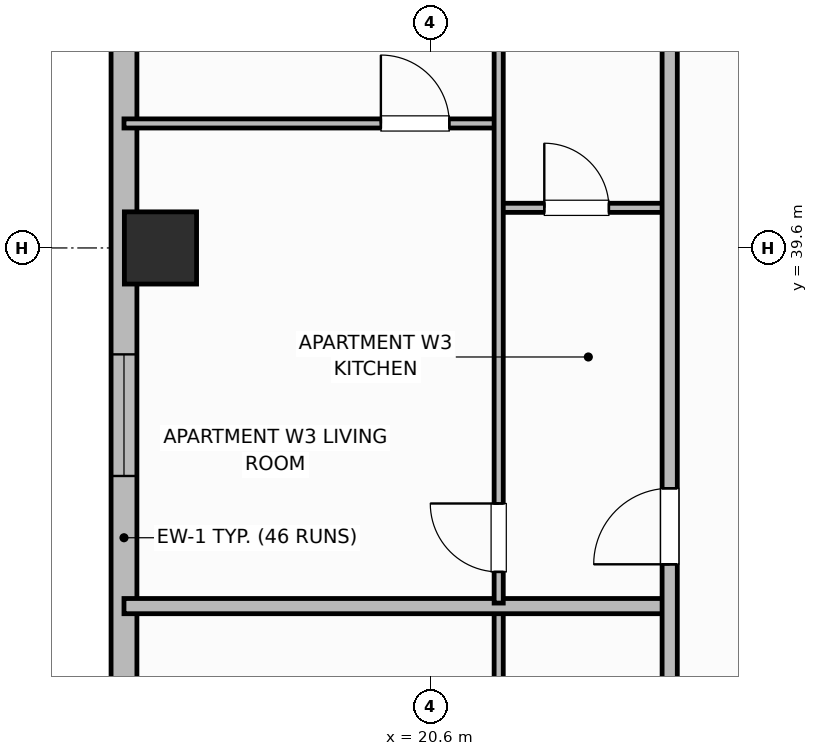
"""IFC4 building model, lengths in metres.
Left out: names, types, materials, properties, quantities, classifications, styles, units other than length and angle.
Written with IfcOpenShell. Run it as: python <this file> out.ifc"""

import sys

from ifc_helpers import new_model, si_unit, direction, frame, frame_2d, origin, origin_2d, place, context, subcontext, project, spatial, rectangle, extrude, element, fill, save


model = new_model("IFC4")
c1 = context("Model", 3, precision=1e-05, world=origin(), true_north=direction((0.0, 1.0)))
c2 = subcontext(c1, "Body", "Model", "MODEL_VIEW")
j1 = project(units=[si_unit("LENGTHUNIT", "METRE"), si_unit("PLANEANGLEUNIT", "RADIAN")], contexts=[c1])
p1 = place(None, origin())
s1 = spatial("IfcSite", under=j1, at=p1, CompositionType="ELEMENT")
p2 = place(p1, origin())
s2 = spatial("IfcBuilding", under=s1, at=p2, CompositionType="ELEMENT")
p3 = place(p2, frame((0.0, 0.0, 188.5)))
s3 = spatial("IfcBuildingStorey", under=s2, at=p3, CompositionType="ELEMENT", Elevation=188.5)
p4 = place(p3, frame((17.05, 39.6, 0.0), z_axis=(0.0, 0.0, 1.0), x_axis=(1.0, 0.0, 0.0)))
e1 = element("IfcColumn", 1, at=p4, inside=s3, PredefinedType="COLUMN", context=c2, shape_type="SweptSolid", body=[
    extrude(rectangle(XDim=0.95, YDim=0.95, at=origin_2d()), origin(), (0.0, 0.0, 1.0), 3.7),
])
p5 = place(p3, frame((16.57, 45.9, 0.0), z_axis=(0.0, 0.0, 1.0), x_axis=(0.0, -1.0, 0.0)))
e2 = element("IfcWall", 2, at=p5, inside=s3, PredefinedType="SOLIDWALL", context=c2, shape_type="SweptSolid", body=[
    extrude(rectangle(XDim=13.3, YDim=0.34, at=frame_2d((6.65, 0.0))), origin(), (0.0, 0.0, 1.0), 2.72),
])
p6 = place(p5, frame((1.35, 0.0, 0.7)))
e3 = element("IfcOpeningElement", 3, at=p6, cuts=e2, PredefinedType="OPENING", context=c2, shape_type="SweptSolid", body=[
    extrude(rectangle(XDim=1.6, YDim=1.9, at=frame_2d((0.8, 0.95))), frame((0.0, 0.18, 0.0), z_axis=(0.0, -1.0, 0.0), x_axis=(1.0, 0.0, 0.0)), (0.0, 0.0, 1.0), 0.36),
])
p7 = place(p5, frame((7.7, 0.0, 0.7)))
e4 = element("IfcOpeningElement", 4, at=p7, cuts=e2, PredefinedType="OPENING", context=c2, shape_type="SweptSolid", body=[
    extrude(rectangle(XDim=1.6, YDim=1.9, at=frame_2d((0.8, 0.95))), frame((0.0, 0.18, 0.0), z_axis=(0.0, -1.0, 0.0), x_axis=(1.0, 0.0, 0.0)), (0.0, 0.0, 1.0), 0.36),
])
p8 = place(p3, frame((21.5, 23.312, 0.0), z_axis=(0.0, 0.0, 1.0), x_axis=(0.0, 1.0, 0.0)))
e5 = element("IfcWall", 5, at=p8, inside=s3, PredefinedType="PARTITIONING", context=c2, shape_type="SweptSolid", body=[
    extrude(rectangle(XDim=11.536, YDim=0.12, at=frame_2d((5.768, 0.0))), origin(), (0.0, 0.0, 1.0), 2.55),
])
p9 = place(p8, frame((0.41, 0.0, 0.0)))
e6 = element("IfcOpeningElement", 6, at=p9, cuts=e5, PredefinedType="OPENING", context=c2, shape_type="SweptSolid", body=[
    extrude(rectangle(XDim=0.9, YDim=2.1, at=frame_2d((0.45, 1.05))), frame((0.0, 0.07, 0.0), z_axis=(0.0, -1.0, 0.0), x_axis=(1.0, 0.0, 0.0)), (0.0, 0.0, 1.0), 0.14),
])
p10 = place(p3, frame((16.57, 34.888, 0.0), z_axis=(0.0, 0.0, 1.0), x_axis=(1.0, 0.0, 0.0)))
e7 = element("IfcWall", 7, at=p10, inside=s3, PredefinedType="PARTITIONING", context=c2, shape_type="SweptSolid", body=[
    extrude(rectangle(XDim=7.18, YDim=0.2, at=frame_2d((3.59, 0.0))), origin(), (0.0, 0.0, 1.0), 2.55),
])
p11 = place(p3, frame((21.5, 40.128, 0.0), z_axis=(0.0, 0.0, 1.0), x_axis=(1.0, 0.0, 0.0)))
e8 = element("IfcWall", 8, at=p11, inside=s3, PredefinedType="PARTITIONING", context=c2, shape_type="SweptSolid", body=[
    extrude(rectangle(XDim=2.25, YDim=0.12, at=frame_2d((1.125, 0.0))), origin(), (0.0, 0.0, 1.0), 2.55),
])
p12 = place(p11, frame((0.6, 0.0, 0.0)))
e9 = element("IfcOpeningElement", 9, at=p12, cuts=e8, PredefinedType="OPENING", context=c2, shape_type="SweptSolid", body=[
    extrude(rectangle(XDim=0.85, YDim=2.1, at=frame_2d((0.425, 1.05))), frame((0.0, 0.07, 0.0), z_axis=(0.0, -1.0, 0.0), x_axis=(1.0, 0.0, 0.0)), (0.0, 0.0, 1.0), 0.14),
])
p13 = place(p3, frame((16.57, 41.238, 0.0), z_axis=(0.0, 0.0, 1.0), x_axis=(1.0, 0.0, 0.0)))
e10 = element("IfcWall", 10, at=p13, inside=s3, PredefinedType="PARTITIONING", context=c2, shape_type="SweptSolid", body=[
    extrude(rectangle(XDim=4.93, YDim=0.12, at=frame_2d((2.465, 0.0))), origin(), (0.0, 0.0, 1.0), 2.55),
])
p14 = place(p13, frame((3.38, 0.0, 0.0)))
e11 = element("IfcOpeningElement", 11, at=p14, cuts=e10, PredefinedType="OPENING", context=c2, shape_type="SweptSolid", body=[
    extrude(rectangle(XDim=0.9, YDim=2.1, at=frame_2d((0.45, 1.05))), frame((0.0, 0.07, 0.0), z_axis=(0.0, -1.0, 0.0), x_axis=(1.0, 0.0, 0.0)), (0.0, 0.0, 1.0), 0.14),
])
p15 = place(p3, frame((21.5, 34.928, 0.0), z_axis=(0.0, 0.0, 1.0), x_axis=(0.0, 1.0, 0.0)))
e12 = element("IfcWall", 12, at=p15, inside=s3, PredefinedType="PARTITIONING", context=c2, shape_type="SweptSolid", body=[
    extrude(rectangle(XDim=10.832, YDim=0.12, at=frame_2d((5.416, 0.0))), origin(), (0.0, 0.0, 1.0), 2.55),
])
p16 = place(p15, frame((0.41, 0.0, 0.0)))
e13 = element("IfcOpeningElement", 13, at=p16, cuts=e12, PredefinedType="OPENING", context=c2, shape_type="SweptSolid", body=[
    extrude(rectangle(XDim=0.9, YDim=2.1, at=frame_2d((0.45, 1.05))), frame((0.0, 0.07, 0.0), z_axis=(0.0, -1.0, 0.0), x_axis=(1.0, 0.0, 0.0)), (0.0, 0.0, 1.0), 0.14),
])
p17 = place(p3, frame((23.75, 10.6, 0.0), z_axis=(0.0, 0.0, 1.0), x_axis=(0.0, 1.0, 0.0)))
e14 = element("IfcWall", 14, at=p17, inside=s3, PredefinedType="PARTITIONING", context=c2, shape_type="SweptSolid", body=[
    extrude(rectangle(XDim=35.2, YDim=0.2, at=frame_2d((17.6, 0.0))), origin(), (0.0, 0.0, 1.0), 2.55),
])
p18 = place(p17, frame((2.65, 0.0, 0.0)))
e15 = element("IfcOpeningElement", 15, at=p18, cuts=e14, PredefinedType="OPENING", context=c2, shape_type="SweptSolid", body=[
    extrude(rectangle(XDim=1.0, YDim=2.15, at=frame_2d((0.5, 1.075))), frame((0.0, 0.11, 0.0), z_axis=(0.0, -1.0, 0.0), x_axis=(1.0, 0.0, 0.0)), (0.0, 0.0, 1.0), 0.22),
])
p19 = place(p17, frame((13.222, 0.0, 0.0)))
e16 = element("IfcOpeningElement", 16, at=p19, cuts=e14, PredefinedType="OPENING", context=c2, shape_type="SweptSolid", body=[
    extrude(rectangle(XDim=1.0, YDim=2.15, at=frame_2d((0.5, 1.075))), frame((0.0, 0.11, 0.0), z_axis=(0.0, -1.0, 0.0), x_axis=(1.0, 0.0, 0.0)), (0.0, 0.0, 1.0), 0.22),
])
p20 = place(p17, frame((24.838, 0.0, 0.0)))
e17 = element("IfcOpeningElement", 17, at=p20, cuts=e14, PredefinedType="OPENING", context=c2, shape_type="SweptSolid", body=[
    extrude(rectangle(XDim=1.0, YDim=2.15, at=frame_2d((0.5, 1.075))), frame((0.0, 0.11, 0.0), z_axis=(0.0, -1.0, 0.0), x_axis=(1.0, 0.0, 0.0)), (0.0, 0.0, 1.0), 0.22),
])
p21 = place(p7, origin())
e18 = element("IfcWindow", 18, at=p21, inside=s3, PartitioningType="SINGLE_PANEL", PredefinedType="WINDOW", context=c2, shape_type="SweptSolid", body=[
    extrude(rectangle(XDim=1.6, YDim=1.9, at=frame_2d((0.8, 0.95))), frame((0.0, 0.03, 0.0), z_axis=(0.0, -1.0, 0.0), x_axis=(1.0, 0.0, 0.0)), (0.0, 0.0, 1.0), 0.06),
])
fill(e4, e18)
p22 = place(p12, origin())
e19 = element("IfcDoor", 19, at=p22, inside=s3, OperationType="SINGLE_SWING_LEFT", PredefinedType="DOOR", context=c2, shape_type="SweptSolid", body=[
    extrude(rectangle(XDim=0.85, YDim=2.1, at=frame_2d((0.425, 1.05))), frame((0.0, 0.025, 0.0), z_axis=(0.0, -1.0, 0.0), x_axis=(1.0, 0.0, 0.0)), (0.0, 0.0, 1.0), 0.05),
])
fill(e9, e19)
p23 = place(p14, origin())
e20 = element("IfcDoor", 20, at=p23, inside=s3, OperationType="SINGLE_SWING_LEFT", PredefinedType="DOOR", context=c2, shape_type="SweptSolid", body=[
    extrude(rectangle(XDim=0.9, YDim=2.1, at=frame_2d((0.45, 1.05))), frame((0.0, 0.025, 0.0), z_axis=(0.0, -1.0, 0.0), x_axis=(1.0, 0.0, 0.0)), (0.0, 0.0, 1.0), 0.05),
])
fill(e11, e20)
p24 = place(p16, origin())
e21 = element("IfcDoor", 21, at=p24, inside=s3, OperationType="SINGLE_SWING_RIGHT", PredefinedType="DOOR", context=c2, shape_type="SweptSolid", body=[
    extrude(rectangle(XDim=0.9, YDim=2.1, at=frame_2d((0.45, 1.05))), frame((0.0, 0.025, 0.0), z_axis=(0.0, -1.0, 0.0), x_axis=(1.0, 0.0, 0.0)), (0.0, 0.0, 1.0), 0.05),
])
fill(e13, e21)
p25 = place(p20, origin())
e22 = element("IfcDoor", 22, at=p25, inside=s3, OperationType="SINGLE_SWING_LEFT", PredefinedType="DOOR", context=c2, shape_type="SweptSolid", body=[
    extrude(rectangle(XDim=1.0, YDim=2.15, at=frame_2d((0.5, 1.075))), frame((0.0, 0.025, 0.0), z_axis=(0.0, -1.0, 0.0), x_axis=(1.0, 0.0, 0.0)), (0.0, 0.0, 1.0), 0.05),
])
fill(e17, e22)
save(model, sys.argv[1])
